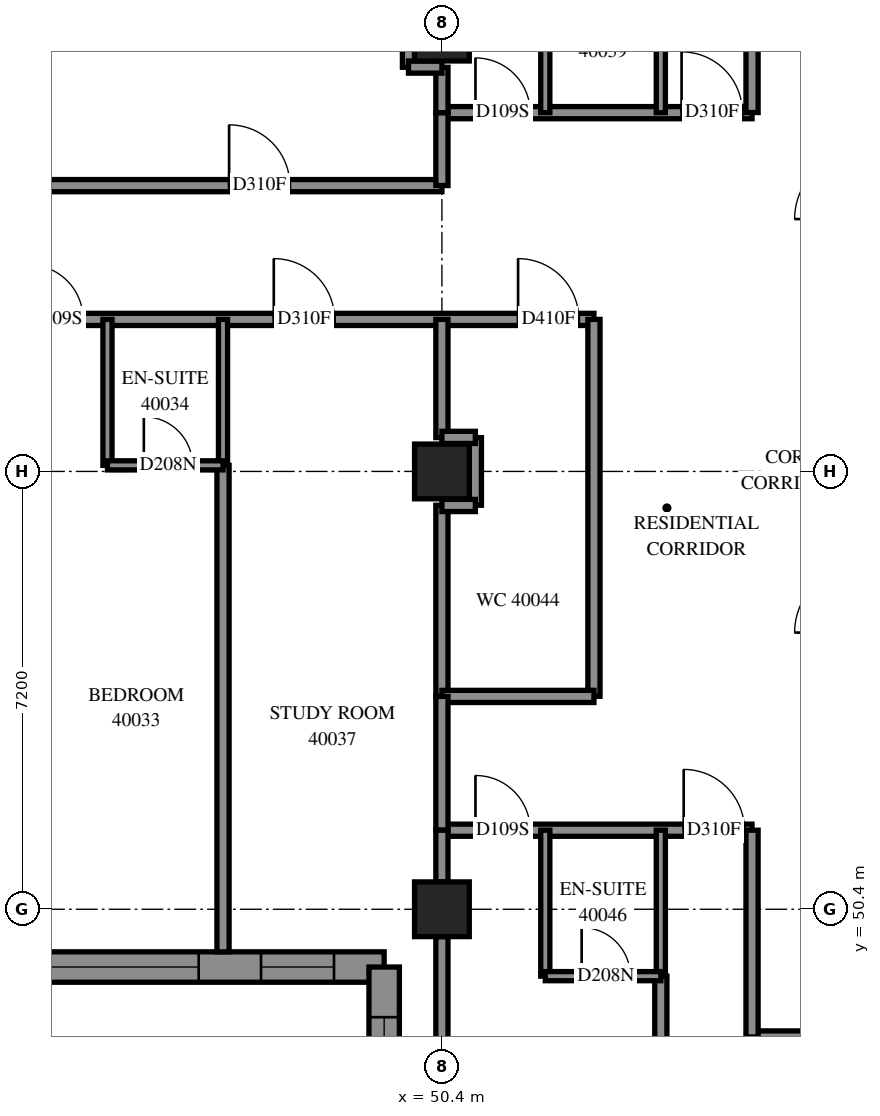
"""IFC4 building model, lengths in metres.
Left out: names, types, materials, properties, quantities, classifications, styles, units other than length and angle.
Written with IfcOpenShell. Run it as: python <this file> out.ifc"""

import sys

from ifc_helpers import new_model, si_unit, direction, frame, frame_2d, origin, origin_2d, place, context, subcontext, project, spatial, polyline, rectangle, outline, extrude, element, fill, save


model = new_model("IFC4")
c1 = context("Model", 3, precision=1e-05, world=origin(), true_north=direction((0.0, 1.0)))
c2 = subcontext(c1, "Body", "Model", "MODEL_VIEW")
j1 = project(units=[si_unit("LENGTHUNIT", "METRE"), si_unit("PLANEANGLEUNIT", "RADIAN")], contexts=[c1])
p1 = place(None, origin())
s1 = spatial("IfcSite", under=j1, at=p1, CompositionType="ELEMENT")
p2 = place(p1, origin())
s2 = spatial("IfcBuilding", under=s1, at=p2, CompositionType="ELEMENT")
p3 = place(p2, frame((0.0, 0.0, 149.0)))
s3 = spatial("IfcBuildingStorey", under=s2, at=p3, CompositionType="ELEMENT", Elevation=149.0)
for number, where, z_axis, x_axis in (
    (1, (50.4, 50.4, 0.0), (0.0, 0.0, 1.0), (1.0, 0.0, 0.0)),
    (2, (50.4, 57.6, 0.0), (0.0, 0.0, 1.0), (1.0, 0.0, 0.0)),
    (3, (50.4, 64.8, 0.0), (0.0, 0.0, 1.0), (1.0, 0.0, 0.0)),
):
    element("IfcColumn", number, at=place(p3, frame(where, z_axis=z_axis, x_axis=x_axis)), inside=s3, PredefinedType="COLUMN", context=c2, shape_type="SweptSolid", body=[
        extrude(rectangle(XDim=0.9, YDim=0.9, at=origin_2d()), origin(), (0.0, 0.0, 1.0), 3.1),
    ])
p4 = place(p3, frame((42.25, 49.45, 0.0), z_axis=(0.0, 0.0, 1.0), x_axis=(1.0, 0.0, 0.0)))
e4 = element("IfcWall", 4, at=p4, inside=s3, PredefinedType="SOLIDWALL", context=c2, shape_type="SweptSolid", body=[
    extrude(outline(polyline([(-0.25, -0.25), (6.95, -0.25), (7.45, 0.25), (0.25, 0.25), (-0.25, -0.25)])), origin(), (0.0, 0.0, 1.0), 3.1),
])
p5 = place(p4, frame((1.35, 0.0, 0.45)))
e5 = element("IfcOpeningElement", 5, at=p5, cuts=e4, PredefinedType="OPENING", context=c2, shape_type="SweptSolid", body=[
    extrude(rectangle(XDim=2.8, YDim=2.5, at=frame_2d((1.4, 1.25))), frame((0.0, 0.26, 0.0), z_axis=(0.0, -1.0, 0.0), x_axis=(1.0, 0.0, 0.0)), (0.0, 0.0, 1.0), 0.52),
])
p6 = place(p4, frame((5.175, 0.0, 0.45)))
e6 = element("IfcOpeningElement", 6, at=p6, cuts=e4, PredefinedType="OPENING", context=c2, shape_type="SweptSolid", body=[
    extrude(rectangle(XDim=1.2, YDim=2.5, at=frame_2d((0.6, 1.25))), frame((0.0, 0.26, 0.0), z_axis=(0.0, -1.0, 0.0), x_axis=(1.0, 0.0, 0.0)), (0.0, 0.0, 1.0), 0.52),
])
p7 = place(p3, frame((49.45, 49.45, 0.0), z_axis=(0.0, 0.0, 1.0), x_axis=(0.0, -1.0, 0.0)))
e7 = element("IfcWall", 7, at=p7, inside=s3, PredefinedType="SOLIDWALL", context=c2, shape_type="SweptSolid", body=[
    extrude(outline(polyline([(0.25, -0.25), (8.471, -0.25), (7.8, 0.25), (-0.25, 0.25), (0.25, -0.25)])), origin(), (0.0, 0.0, 1.0), 3.1),
])
p8 = place(p7, frame((3.05, 0.0, 0.45)))
e8 = element("IfcOpeningElement", 8, at=p8, cuts=e7, PredefinedType="OPENING", context=c2, shape_type="SweptSolid", body=[
    extrude(rectangle(XDim=2.8, YDim=2.5, at=frame_2d((1.4, 1.25))), frame((0.0, 0.26, 0.0), z_axis=(0.0, -1.0, 0.0), x_axis=(1.0, 0.0, 0.0)), (0.0, 0.0, 1.0), 0.52),
])
p9 = place(p7, frame((0.825, 0.0, 0.45)))
e9 = element("IfcOpeningElement", 9, at=p9, cuts=e7, PredefinedType="OPENING", context=c2, shape_type="SweptSolid", body=[
    extrude(rectangle(XDim=1.2, YDim=2.5, at=frame_2d((0.6, 1.25))), frame((0.0, 0.26, 0.0), z_axis=(0.0, -1.0, 0.0), x_axis=(1.0, 0.0, 0.0)), (0.0, 0.0, 1.0), 0.52),
])
p10 = place(p3, frame((55.5, 48.3, 0.0), z_axis=(0.0, 0.0, 1.0), x_axis=(1.0, 0.0, 0.0)))
e10 = element("IfcWall", 10, at=p10, inside=s3, PredefinedType="PARTITIONING", context=c2, shape_type="SweptSolid", body=[
    extrude(rectangle(XDim=18.974, YDim=0.2, at=frame_2d((9.487, 0.0))), origin(), (0.0, 0.0, 1.0), 3.1),
])
p11 = place(p10, frame((4.4, 0.0, 0.0)))
e11 = element("IfcOpeningElement", 11, at=p11, cuts=e10, PredefinedType="OPENING", context=c2, shape_type="SweptSolid", body=[
    extrude(rectangle(XDim=0.9, YDim=2.1, at=frame_2d((0.45, 1.05))), frame((0.0, 0.11, 0.0), z_axis=(0.0, -1.0, 0.0), x_axis=(1.0, 0.0, 0.0)), (0.0, 0.0, 1.0), 0.22),
])
p12 = place(p10, frame((6.1, 0.0, 0.0)))
e12 = element("IfcOpeningElement", 12, at=p12, cuts=e10, PredefinedType="OPENING", context=c2, shape_type="SweptSolid", body=[
    extrude(rectangle(XDim=0.9, YDim=2.1, at=frame_2d((0.45, 1.05))), frame((0.0, 0.11, 0.0), z_axis=(0.0, -1.0, 0.0), x_axis=(1.0, 0.0, 0.0)), (0.0, 0.0, 1.0), 0.22),
])
p13 = place(p10, frame((13.162, 0.0, 0.0)))
e13 = element("IfcOpeningElement", 13, at=p13, cuts=e10, PredefinedType="OPENING", context=c2, shape_type="SweptSolid", body=[
    extrude(rectangle(XDim=1.0, YDim=2.1, at=frame_2d((0.5, 1.05))), frame((0.0, 0.11, 0.0), z_axis=(0.0, -1.0, 0.0), x_axis=(1.0, 0.0, 0.0)), (0.0, 0.0, 1.0), 0.22),
])
p14 = place(p3, frame((36.0, 60.1, 0.0), z_axis=(0.0, 0.0, 1.0), x_axis=(1.0, 0.0, 0.0)))
e14 = element("IfcWall", 14, at=p14, inside=s3, PredefinedType="PARTITIONING", context=c2, shape_type="SweptSolid", body=[
    extrude(rectangle(XDim=16.9, YDim=0.2, at=frame_2d((8.45, 0.0))), origin(), (0.0, 0.0, 1.0), 3.1),
])
p15 = place(p14, frame((4.125, 0.0, 0.0)))
e15 = element("IfcOpeningElement", 15, at=p15, cuts=e14, PredefinedType="OPENING", context=c2, shape_type="SweptSolid", body=[
    extrude(rectangle(XDim=1.0, YDim=2.1, at=frame_2d((0.5, 1.05))), frame((0.0, 0.11, 0.0), z_axis=(0.0, -1.0, 0.0), x_axis=(1.0, 0.0, 0.0)), (0.0, 0.0, 1.0), 0.22),
])
p16 = place(p14, frame((7.6, 0.0, 0.0)))
e16 = element("IfcOpeningElement", 16, at=p16, cuts=e14, PredefinedType="OPENING", context=c2, shape_type="SweptSolid", body=[
    extrude(rectangle(XDim=0.9, YDim=2.1, at=frame_2d((0.45, 1.05))), frame((0.0, 0.11, 0.0), z_axis=(0.0, -1.0, 0.0), x_axis=(1.0, 0.0, 0.0)), (0.0, 0.0, 1.0), 0.22),
])
p17 = place(p14, frame((11.635, 0.0, 0.0)))
e17 = element("IfcOpeningElement", 17, at=p17, cuts=e14, PredefinedType="OPENING", context=c2, shape_type="SweptSolid", body=[
    extrude(rectangle(XDim=1.0, YDim=2.1, at=frame_2d((0.5, 1.05))), frame((0.0, 0.11, 0.0), z_axis=(0.0, -1.0, 0.0), x_axis=(1.0, 0.0, 0.0)), (0.0, 0.0, 1.0), 0.22),
])
p18 = place(p14, frame((15.652, 0.0, 0.0)))
e18 = element("IfcOpeningElement", 18, at=p18, cuts=e14, PredefinedType="OPENING", context=c2, shape_type="SweptSolid", body=[
    extrude(rectangle(XDim=1.0, YDim=2.1, at=frame_2d((0.5, 1.05))), frame((0.0, 0.11, 0.0), z_axis=(0.0, -1.0, 0.0), x_axis=(1.0, 0.0, 0.0)), (0.0, 0.0, 1.0), 0.22),
])
p19 = place(p3, frame((40.702, 62.3, 0.0), z_axis=(0.0, 0.0, 1.0), x_axis=(1.0, 0.0, 0.0)))
e19 = element("IfcWall", 19, at=p19, inside=s3, PredefinedType="PARTITIONING", context=c2, shape_type="SweptSolid", body=[
    extrude(rectangle(XDim=9.698, YDim=0.2, at=frame_2d((4.849, 0.0))), origin(), (0.0, 0.0, 1.0), 3.1),
])
p20 = place(p19, frame((6.198, 0.0, 0.0)))
e20 = element("IfcOpeningElement", 20, at=p20, cuts=e19, PredefinedType="OPENING", context=c2, shape_type="SweptSolid", body=[
    extrude(rectangle(XDim=1.0, YDim=2.1, at=frame_2d((0.5, 1.05))), frame((0.0, 0.11, 0.0), z_axis=(0.0, -1.0, 0.0), x_axis=(1.0, 0.0, 0.0)), (0.0, 0.0, 1.0), 0.22),
])
p21 = place(p3, frame((46.8, 49.7, 0.0), z_axis=(0.0, 0.0, 1.0), x_axis=(0.0, 1.0, 0.0)))
e21 = element("IfcWall", 21, at=p21, inside=s3, PredefinedType="PARTITIONING", context=c2, shape_type="SweptSolid", body=[
    extrude(rectangle(XDim=8.0, YDim=0.2, at=frame_2d((4.0, 0.0))), origin(), (0.0, 0.0, 1.0), 3.1),
])
p22 = place(p3, frame((54.0, 42.333, 0.0), z_axis=(0.0, 0.0, 1.0), x_axis=(0.0, 1.0, 0.0)))
e22 = element("IfcWall", 22, at=p22, inside=s3, PredefinedType="PARTITIONING", context=c2, shape_type="SweptSolid", body=[
    extrude(rectangle(XDim=6.967, YDim=0.2, at=frame_2d((3.483, 0.0))), origin(), (0.0, 0.0, 1.0), 3.1),
])
p23 = place(p3, frame((50.4, 43.65, 0.0), z_axis=(0.0, 0.0, 1.0), x_axis=(0.0, 1.0, 0.0)))
e23 = element("IfcWall", 23, at=p23, inside=s3, PredefinedType="PARTITIONING", context=c2, shape_type="SweptSolid", body=[
    extrude(rectangle(XDim=6.3, YDim=0.2, at=frame_2d((3.15, 0.0))), origin(), (0.0, 0.0, 1.0), 2.6),
])
p24 = place(p3, frame((52.9, 53.902, 0.0), z_axis=(0.0, 0.0, 1.0), x_axis=(0.0, 1.0, 0.0)))
e24 = element("IfcWall", 24, at=p24, inside=s3, PredefinedType="PARTITIONING", context=c2, shape_type="SweptSolid", body=[
    extrude(rectangle(XDim=6.198, YDim=0.2, at=frame_2d((3.099, 0.0))), origin(), (0.0, 0.0, 1.0), 3.1),
])
p25 = place(p3, frame((50.4, 51.7, 0.0), z_axis=(0.0, 0.0, 1.0), x_axis=(1.0, 0.0, 0.0)))
e25 = element("IfcWall", 25, at=p25, inside=s3, PredefinedType="PARTITIONING", context=c2, shape_type="SweptSolid", body=[
    extrude(rectangle(XDim=5.1, YDim=0.2, at=frame_2d((2.55, 0.0))), origin(), (0.0, 0.0, 1.0), 3.1),
])
p26 = place(p25, frame((0.552, 0.0, 0.0)))
e26 = element("IfcOpeningElement", 26, at=p26, cuts=e25, PredefinedType="OPENING", context=c2, shape_type="SweptSolid", body=[
    extrude(rectangle(XDim=0.9, YDim=2.1, at=frame_2d((0.45, 1.05))), frame((0.0, 0.11, 0.0), z_axis=(0.0, -1.0, 0.0), x_axis=(1.0, 0.0, 0.0)), (0.0, 0.0, 1.0), 0.22),
])
p27 = place(p25, frame((3.976, 0.0, 0.0)))
e27 = element("IfcOpeningElement", 27, at=p27, cuts=e25, PredefinedType="OPENING", context=c2, shape_type="SweptSolid", body=[
    extrude(rectangle(XDim=1.0, YDim=2.1, at=frame_2d((0.5, 1.05))), frame((0.0, 0.11, 0.0), z_axis=(0.0, -1.0, 0.0), x_axis=(1.0, 0.0, 0.0)), (0.0, 0.0, 1.0), 0.22),
])
p28 = place(p3, frame((50.4, 63.5, 0.0), z_axis=(0.0, 0.0, 1.0), x_axis=(1.0, 0.0, 0.0)))
e28 = element("IfcWall", 28, at=p28, inside=s3, PredefinedType="PARTITIONING", context=c2, shape_type="SweptSolid", body=[
    extrude(rectangle(XDim=5.1, YDim=0.2, at=frame_2d((2.55, 0.0))), origin(), (0.0, 0.0, 1.0), 3.1),
])
p29 = place(p28, frame((0.552, 0.0, 0.0)))
e29 = element("IfcOpeningElement", 29, at=p29, cuts=e28, PredefinedType="OPENING", context=c2, shape_type="SweptSolid", body=[
    extrude(rectangle(XDim=0.9, YDim=2.1, at=frame_2d((0.45, 1.05))), frame((0.0, 0.11, 0.0), z_axis=(0.0, -1.0, 0.0), x_axis=(1.0, 0.0, 0.0)), (0.0, 0.0, 1.0), 0.22),
])
p30 = place(p28, frame((3.941, 0.0, 0.0)))
e30 = element("IfcOpeningElement", 30, at=p30, cuts=e28, PredefinedType="OPENING", context=c2, shape_type="SweptSolid", body=[
    extrude(rectangle(XDim=1.0, YDim=2.1, at=frame_2d((0.5, 1.05))), frame((0.0, 0.11, 0.0), z_axis=(0.0, -1.0, 0.0), x_axis=(1.0, 0.0, 0.0)), (0.0, 0.0, 1.0), 0.22),
])
p31 = place(p3, frame((55.5, 48.3, 0.0), z_axis=(0.0, 0.0, 1.0), x_axis=(0.0, 1.0, 0.0)))
e31 = element("IfcWall", 31, at=p31, inside=s3, PredefinedType="PARTITIONING", context=c2, shape_type="SweptSolid", body=[
    extrude(rectangle(XDim=3.4, YDim=0.2, at=frame_2d((1.7, 0.0))), origin(), (0.0, 0.0, 1.0), 3.1),
])
p32 = place(p3, frame((55.5, 63.502, 0.0), z_axis=(0.0, 0.0, 1.0), x_axis=(0.0, 1.0, 0.0)))
e32 = element("IfcWall", 32, at=p32, inside=s3, PredefinedType="PARTITIONING", context=c2, shape_type="SweptSolid", body=[
    extrude(rectangle(XDim=3.398, YDim=0.2, at=frame_2d((1.699, 0.0))), origin(), (0.0, 0.0, 1.0), 3.1),
])
p33 = place(p3, frame((50.4, 53.9, 0.0), z_axis=(0.0, 0.0, 1.0), x_axis=(0.0, 1.0, 0.0)))
e33 = element("IfcWall", 33, at=p33, inside=s3, PredefinedType="PARTITIONING", context=c2, shape_type="SweptSolid", body=[
    extrude(rectangle(XDim=3.144, YDim=0.2, at=frame_2d((1.572, 0.0))), origin(), (0.0, 0.0, 1.0), 3.1),
])
p34 = place(p3, frame((50.4, 53.9, 0.0), z_axis=(0.0, 0.0, 1.0), x_axis=(1.0, 0.0, 0.0)))
e34 = element("IfcWall", 34, at=p34, inside=s3, PredefinedType="PARTITIONING", context=c2, shape_type="SweptSolid", body=[
    extrude(rectangle(XDim=2.5, YDim=0.2, at=frame_2d((1.25, 0.0))), origin(), (0.0, 0.0, 1.0), 3.1),
])
for number, where, z_axis, x_axis in (
    (35, (52.1, 49.3, 0.0), (0.0, 0.0, 1.0), (0.0, 1.0, 0.0)),
    (36, (52.1, 63.5, 0.0), (0.0, 0.0, 1.0), (0.0, 1.0, 0.0)),
    (37, (54.0, 49.3, 0.0), (0.0, 0.0, 1.0), (0.0, 1.0, 0.0)),
    (38, (54.0, 63.5, 0.0), (0.0, 0.0, 1.0), (0.0, 1.0, 0.0)),
    (39, (44.9, 57.7, 0.0), (0.0, 0.0, 1.0), (0.0, 1.0, 0.0)),
    (40, (46.8, 57.7, 0.0), (0.0, 0.0, 1.0), (0.0, 1.0, 0.0)),
):
    element("IfcWall", number, at=place(p3, frame(where, z_axis=z_axis, x_axis=x_axis)), inside=s3, PredefinedType="PARTITIONING", context=c2, shape_type="SweptSolid", body=[
        extrude(rectangle(XDim=2.4, YDim=0.15, at=frame_2d((1.2, 0.0))), origin(), (0.0, 0.0, 1.0), 3.1),
    ])
p35 = place(p3, frame((50.4, 51.7, 0.0), z_axis=(0.0, 0.0, 1.0), x_axis=(0.0, 1.0, 0.0)))
e41 = element("IfcWall", 41, at=p35, inside=s3, PredefinedType="PARTITIONING", context=c2, shape_type="SweptSolid", body=[
    extrude(rectangle(XDim=2.2, YDim=0.2, at=frame_2d((1.1, 0.0))), origin(), (0.0, 0.0, 1.0), 3.1),
])
p36 = place(p3, frame((50.4, 58.156, 0.0), z_axis=(0.0, 0.0, 1.0), x_axis=(0.0, 1.0, 0.0)))
e42 = element("IfcWall", 42, at=p36, inside=s3, PredefinedType="PARTITIONING", context=c2, shape_type="SweptSolid", body=[
    extrude(rectangle(XDim=1.944, YDim=0.2, at=frame_2d((0.972, 0.0))), origin(), (0.0, 0.0, 1.0), 3.1),
])
p37 = place(p3, frame((44.9, 57.7, 0.0), z_axis=(0.0, 0.0, 1.0), x_axis=(1.0, 0.0, 0.0)))
e43 = element("IfcWall", 43, at=p37, inside=s3, PredefinedType="PARTITIONING", context=c2, shape_type="SweptSolid", body=[
    extrude(rectangle(XDim=1.9, YDim=0.15, at=frame_2d((0.95, 0.0))), origin(), (0.0, 0.0, 1.0), 3.1),
])
p38 = place(p37, frame((0.598, 0.0, 0.0)))
e44 = element("IfcOpeningElement", 44, at=p38, cuts=e43, PredefinedType="OPENING", context=c2, shape_type="SweptSolid", body=[
    extrude(rectangle(XDim=0.8, YDim=2.1, at=frame_2d((0.4, 1.05))), frame((0.0, 0.085, 0.0), z_axis=(0.0, -1.0, 0.0), x_axis=(1.0, 0.0, 0.0)), (0.0, 0.0, 1.0), 0.17),
])
p39 = place(p3, frame((52.1, 49.3, 0.0), z_axis=(0.0, 0.0, 1.0), x_axis=(1.0, 0.0, 0.0)))
e45 = element("IfcWall", 45, at=p39, inside=s3, PredefinedType="PARTITIONING", context=c2, shape_type="SweptSolid", body=[
    extrude(rectangle(XDim=1.9, YDim=0.15, at=frame_2d((0.95, 0.0))), origin(), (0.0, 0.0, 1.0), 3.1),
])
p40 = place(p39, frame((0.598, 0.0, 0.0)))
e46 = element("IfcOpeningElement", 46, at=p40, cuts=e45, PredefinedType="OPENING", context=c2, shape_type="SweptSolid", body=[
    extrude(rectangle(XDim=0.8, YDim=2.1, at=frame_2d((0.4, 1.05))), frame((0.0, 0.085, 0.0), z_axis=(0.0, -1.0, 0.0), x_axis=(1.0, 0.0, 0.0)), (0.0, 0.0, 1.0), 0.17),
])
p41 = place(p3, frame((50.4, 62.302, 0.0), z_axis=(0.0, 0.0, 1.0), x_axis=(0.0, 1.0, 0.0)))
e47 = element("IfcWall", 47, at=p41, inside=s3, PredefinedType="PARTITIONING", context=c2, shape_type="SweptSolid", body=[
    extrude(rectangle(XDim=1.198, YDim=0.2, at=frame_2d((0.599, 0.0))), origin(), (0.0, 0.0, 1.0), 3.1),
])
p42 = place(p3, frame((50.95, 57.044, 0.0), z_axis=(0.0, 0.0, 1.0), x_axis=(0.0, 1.0, 0.0)))
e48 = element("IfcWall", 48, at=p42, inside=s3, PredefinedType="PARTITIONING", context=c2, shape_type="SweptSolid", body=[
    extrude(rectangle(XDim=1.112, YDim=0.2, at=frame_2d((0.556, 0.0))), origin(), (0.0, 0.0, 1.0), 3.1),
])
p43 = place(p3, frame((49.85, 64.246, 0.0), z_axis=(0.0, 0.0, 1.0), x_axis=(0.0, 1.0, 0.0)))
e49 = element("IfcWall", 49, at=p43, inside=s3, PredefinedType="PARTITIONING", context=c2, shape_type="SweptSolid", body=[
    extrude(rectangle(XDim=1.108, YDim=0.2, at=frame_2d((0.554, 0.0))), origin(), (0.0, 0.0, 1.0), 3.1),
])
p44 = place(p3, frame((50.4, 50.85, 0.0), z_axis=(0.0, 0.0, 1.0), x_axis=(0.0, 1.0, 0.0)))
e50 = element("IfcWall", 50, at=p44, inside=s3, PredefinedType="PARTITIONING", context=c2, shape_type="SweptSolid", body=[
    extrude(rectangle(XDim=0.85, YDim=0.2, at=frame_2d((0.425, 0.0))), origin(), (0.0, 0.0, 1.0), 3.1),
])
p45 = place(p3, frame((50.4, 63.5, 0.0), z_axis=(0.0, 0.0, 1.0), x_axis=(0.0, 1.0, 0.0)))
e51 = element("IfcWall", 51, at=p45, inside=s3, PredefinedType="PARTITIONING", context=c2, shape_type="SweptSolid", body=[
    extrude(rectangle(XDim=0.746, YDim=0.2, at=frame_2d((0.373, 0.0))), origin(), (0.0, 0.0, 1.0), 3.1),
])
for number, where, z_axis, x_axis in (
    (52, (50.4, 58.16, 0.0), (0.0, 0.0, 1.0), (1.0, 0.0, 0.0)),
    (53, (50.4, 57.04, 0.0), (0.0, 0.0, 1.0), (1.0, 0.0, 0.0)),
    (54, (49.85, 64.25, 0.0), (0.0, 0.0, 1.0), (1.0, 0.0, 0.0)),
):
    element("IfcWall", number, at=place(p3, frame(where, z_axis=z_axis, x_axis=x_axis)), inside=s3, PredefinedType="PARTITIONING", context=c2, shape_type="SweptSolid", body=[
        extrude(rectangle(XDim=0.55, YDim=0.2, at=frame_2d((0.275, 0.0))), origin(), (0.0, 0.0, 1.0), 3.1),
    ])
p46 = place(p5, origin())
e55 = element("IfcWindow", 55, at=p46, inside=s3, PartitioningType="SINGLE_PANEL", PredefinedType="WINDOW", context=c2, shape_type="SweptSolid", body=[
    extrude(rectangle(XDim=2.8, YDim=2.5, at=frame_2d((1.4, 1.25))), frame((0.0, 0.18, 0.0), z_axis=(0.0, -1.0, 0.0), x_axis=(1.0, 0.0, 0.0)), (0.0, 0.0, 1.0), 0.06),
])
fill(e5, e55)
p47 = place(p6, origin())
e56 = element("IfcWindow", 56, at=p47, inside=s3, PartitioningType="SINGLE_PANEL", PredefinedType="WINDOW", context=c2, shape_type="SweptSolid", body=[
    extrude(rectangle(XDim=1.2, YDim=2.5, at=frame_2d((0.6, 1.25))), frame((0.0, 0.18, 0.0), z_axis=(0.0, -1.0, 0.0), x_axis=(1.0, 0.0, 0.0)), (0.0, 0.0, 1.0), 0.06),
])
fill(e6, e56)
p48 = place(p9, origin())
e57 = element("IfcWindow", 57, at=p48, inside=s3, PartitioningType="SINGLE_PANEL", PredefinedType="WINDOW", context=c2, shape_type="SweptSolid", body=[
    extrude(rectangle(XDim=1.2, YDim=2.5, at=frame_2d((0.6, 1.25))), frame((0.0, 0.18, 0.0), z_axis=(0.0, -1.0, 0.0), x_axis=(1.0, 0.0, 0.0)), (0.0, 0.0, 1.0), 0.06),
])
fill(e9, e57)
p49 = place(p16, origin())
e58 = element("IfcDoor", 58, at=p49, inside=s3, OperationType="SINGLE_SWING_LEFT", PredefinedType="DOOR", context=c2, shape_type="SweptSolid", body=[
    extrude(rectangle(XDim=0.9, YDim=2.1, at=frame_2d((0.45, 1.05))), frame((0.0, 0.025, 0.0), z_axis=(0.0, -1.0, 0.0), x_axis=(1.0, 0.0, 0.0)), (0.0, 0.0, 1.0), 0.05),
])
fill(e16, e58)
p50 = place(p38, origin())
e59 = element("IfcDoor", 59, at=p50, inside=s3, OperationType="SINGLE_SWING_RIGHT", PredefinedType="DOOR", context=c2, shape_type="SweptSolid", body=[
    extrude(rectangle(XDim=0.8, YDim=2.1, at=frame_2d((0.4, 1.05))), frame((0.0, 0.025, 0.0), z_axis=(0.0, -1.0, 0.0), x_axis=(1.0, 0.0, 0.0)), (0.0, 0.0, 1.0), 0.05),
])
fill(e44, e59)
p51 = place(p20, origin())
e60 = element("IfcDoor", 60, at=p51, inside=s3, OperationType="SINGLE_SWING_RIGHT", PredefinedType="DOOR", context=c2, shape_type="SweptSolid", body=[
    extrude(rectangle(XDim=1.0, YDim=2.1, at=frame_2d((0.5, 1.05))), frame((0.0, 0.025, 0.0), z_axis=(0.0, -1.0, 0.0), x_axis=(1.0, 0.0, 0.0)), (0.0, 0.0, 1.0), 0.05),
])
fill(e20, e60)
p52 = place(p17, origin())
e61 = element("IfcDoor", 61, at=p52, inside=s3, OperationType="SINGLE_SWING_RIGHT", PredefinedType="DOOR", context=c2, shape_type="SweptSolid", body=[
    extrude(rectangle(XDim=1.0, YDim=2.1, at=frame_2d((0.5, 1.05))), frame((0.0, 0.025, 0.0), z_axis=(0.0, -1.0, 0.0), x_axis=(1.0, 0.0, 0.0)), (0.0, 0.0, 1.0), 0.05),
])
fill(e17, e61)
p53 = place(p29, origin())
e62 = element("IfcDoor", 62, at=p53, inside=s3, OperationType="SINGLE_SWING_RIGHT", PredefinedType="DOOR", context=c2, shape_type="SweptSolid", body=[
    extrude(rectangle(XDim=0.9, YDim=2.1, at=frame_2d((0.45, 1.05))), frame((0.0, 0.025, 0.0), z_axis=(0.0, -1.0, 0.0), x_axis=(1.0, 0.0, 0.0)), (0.0, 0.0, 1.0), 0.05),
])
fill(e29, e62)
p54 = place(p30, origin())
e63 = element("IfcDoor", 63, at=p54, inside=s3, OperationType="SINGLE_SWING_LEFT", PredefinedType="DOOR", context=c2, shape_type="SweptSolid", body=[
    extrude(rectangle(XDim=1.0, YDim=2.1, at=frame_2d((0.5, 1.05))), frame((0.0, 0.025, 0.0), z_axis=(0.0, -1.0, 0.0), x_axis=(1.0, 0.0, 0.0)), (0.0, 0.0, 1.0), 0.05),
])
fill(e30, e63)
p55 = place(p18, origin())
e64 = element("IfcDoor", 64, at=p55, inside=s3, OperationType="SINGLE_SWING_LEFT", PredefinedType="DOOR", context=c2, shape_type="SweptSolid", body=[
    extrude(rectangle(XDim=1.0, YDim=2.1, at=frame_2d((0.5, 1.05))), frame((0.0, 0.025, 0.0), z_axis=(0.0, -1.0, 0.0), x_axis=(1.0, 0.0, 0.0)), (0.0, 0.0, 1.0), 0.05),
])
fill(e18, e64)
p56 = place(p26, origin())
e65 = element("IfcDoor", 65, at=p56, inside=s3, OperationType="SINGLE_SWING_LEFT", PredefinedType="DOOR", context=c2, shape_type="SweptSolid", body=[
    extrude(rectangle(XDim=0.9, YDim=2.1, at=frame_2d((0.45, 1.05))), frame((0.0, 0.025, 0.0), z_axis=(0.0, -1.0, 0.0), x_axis=(1.0, 0.0, 0.0)), (0.0, 0.0, 1.0), 0.05),
])
fill(e26, e65)
p57 = place(p40, origin())
e66 = element("IfcDoor", 66, at=p57, inside=s3, OperationType="SINGLE_SWING_RIGHT", PredefinedType="DOOR", context=c2, shape_type="SweptSolid", body=[
    extrude(rectangle(XDim=0.8, YDim=2.1, at=frame_2d((0.4, 1.05))), frame((0.0, 0.025, 0.0), z_axis=(0.0, -1.0, 0.0), x_axis=(1.0, 0.0, 0.0)), (0.0, 0.0, 1.0), 0.05),
])
fill(e46, e66)
p58 = place(p27, origin())
e67 = element("IfcDoor", 67, at=p58, inside=s3, OperationType="SINGLE_SWING_RIGHT", PredefinedType="DOOR", context=c2, shape_type="SweptSolid", body=[
    extrude(rectangle(XDim=1.0, YDim=2.1, at=frame_2d((0.5, 1.05))), frame((0.0, 0.025, 0.0), z_axis=(0.0, -1.0, 0.0), x_axis=(1.0, 0.0, 0.0)), (0.0, 0.0, 1.0), 0.05),
])
fill(e27, e67)
save(model, sys.argv[1])
